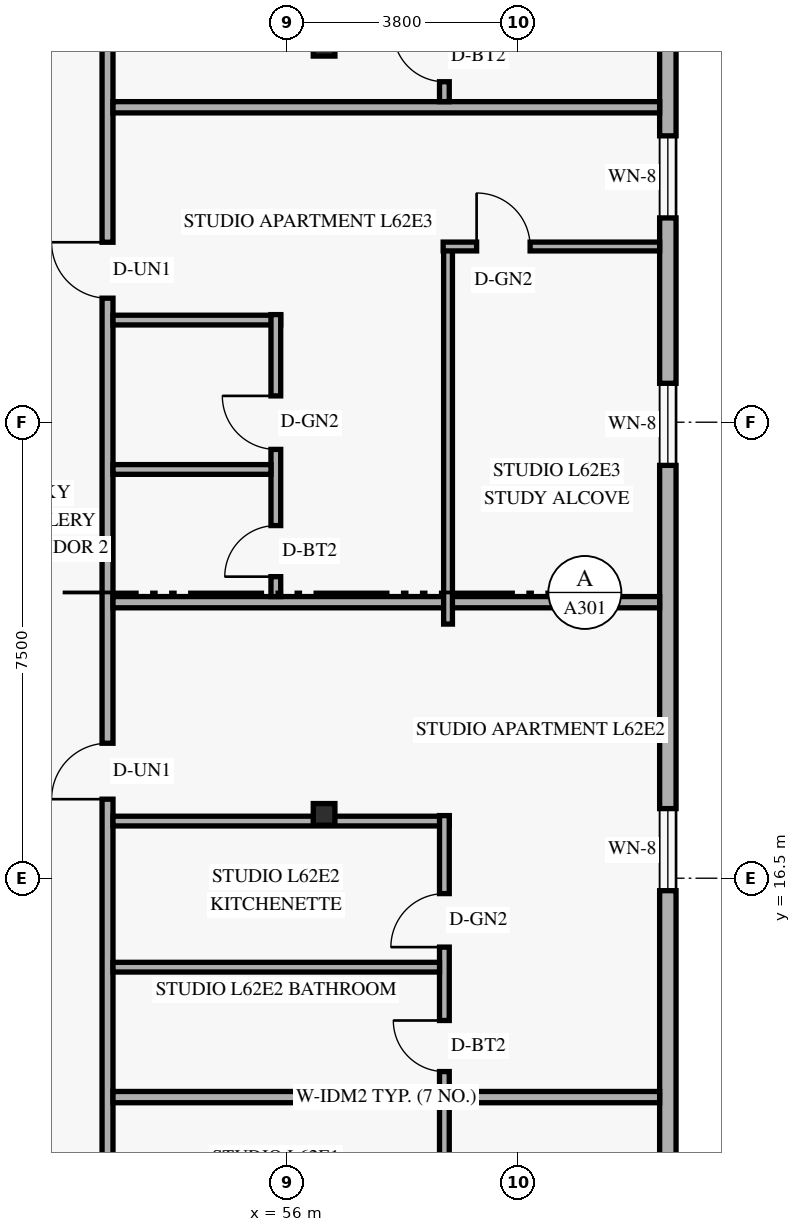
"""IFC4 building model, lengths in metres.
Left out: names, types, materials, properties, quantities, classifications, styles, units other than length and angle.
Written with IfcOpenShell. Run it as: python <this file> out.ifc"""

import sys

from ifc_helpers import new_model, si_unit, direction, frame, frame_2d, origin, origin_2d, place, context, subcontext, project, spatial, rectangle, hollow_rectangle, extrude, element, fill, save


model = new_model("IFC4")
c1 = context("Model", 3, precision=1e-05, world=origin(), true_north=direction((0.0, 1.0)))
c2 = subcontext(c1, "Body", "Model", "MODEL_VIEW")
j1 = project(units=[si_unit("LENGTHUNIT", "METRE"), si_unit("PLANEANGLEUNIT", "RADIAN")], contexts=[c1])
p1 = place(None, origin())
s1 = spatial("IfcSite", under=j1, at=p1, CompositionType="ELEMENT")
p2 = place(p1, origin())
s2 = spatial("IfcBuilding", under=s1, at=p2, CompositionType="ELEMENT")
p3 = place(p2, frame((0.0, 0.0, 238.8)))
s3 = spatial("IfcBuildingStorey", under=s2, at=p3, CompositionType="ELEMENT", Elevation=238.8)
for number, where, z_axis, x_axis in (
    (1, (56.507, 17.55, 0.0), (0.058, 0.0, 0.998), (0.0, 1.0, 0.0)),
    (2, (56.507, 30.2, 0.0), (0.058, 0.0, 0.998), (0.0, 1.0, 0.0)),
):
    element("IfcColumn", number, at=place(p3, frame(where, z_axis=z_axis, x_axis=x_axis)), inside=s3, PredefinedType="COLUMN", context=c2, shape_type="SweptSolid", body=[
        extrude(hollow_rectangle(XDim=0.356, YDim=0.356, WallThickness=0.016, at=origin_2d()), origin(), (0.0, 0.0, 1.0), 3.606),
    ])
p4 = place(p3, frame((62.265, 9.12, 0.0), z_axis=(0.0, 0.0, 1.0), x_axis=(0.0, 1.0, 0.0)))
e3 = element("IfcWall", 3, at=p4, inside=s3, PredefinedType="SOLIDWALL", context=c2, shape_type="SweptSolid", body=[
    extrude(rectangle(XDim=29.76, YDim=0.27, at=frame_2d((14.88, 0.0))), origin(), (0.0, 0.0, 1.0), 3.36),
])
p5 = place(p4, frame((1.215, 0.0, 0.85)))
e4 = element("IfcOpeningElement", 4, at=p5, cuts=e3, PredefinedType="OPENING", context=c2, shape_type="SweptSolid", body=[
    extrude(rectangle(XDim=1.35, YDim=1.55, at=frame_2d((0.675, 0.775))), frame((0.0, 0.145, 0.0), z_axis=(0.0, -1.0, 0.0), x_axis=(1.0, 0.0, 0.0)), (0.0, 0.0, 1.0), 0.29),
])
p6 = place(p4, frame((7.175, 0.0, 0.85)))
e5 = element("IfcOpeningElement", 5, at=p6, cuts=e3, PredefinedType="OPENING", context=c2, shape_type="SweptSolid", body=[
    extrude(rectangle(XDim=1.35, YDim=1.55, at=frame_2d((0.675, 0.775))), frame((0.0, 0.145, 0.0), z_axis=(0.0, -1.0, 0.0), x_axis=(1.0, 0.0, 0.0)), (0.0, 0.0, 1.0), 0.29),
])
p7 = place(p4, frame((14.17, 0.0, 0.85)))
e6 = element("IfcOpeningElement", 6, at=p7, cuts=e3, PredefinedType="OPENING", context=c2, shape_type="SweptSolid", body=[
    extrude(rectangle(XDim=1.35, YDim=1.55, at=frame_2d((0.675, 0.775))), frame((0.0, 0.145, 0.0), z_axis=(0.0, -1.0, 0.0), x_axis=(1.0, 0.0, 0.0)), (0.0, 0.0, 1.0), 0.29),
])
p8 = place(p4, frame((18.24, 0.0, 0.85)))
e7 = element("IfcOpeningElement", 7, at=p8, cuts=e3, PredefinedType="OPENING", context=c2, shape_type="SweptSolid", body=[
    extrude(rectangle(XDim=1.35, YDim=1.55, at=frame_2d((0.675, 0.775))), frame((0.0, 0.145, 0.0), z_axis=(0.0, -1.0, 0.0), x_axis=(1.0, 0.0, 0.0)), (0.0, 0.0, 1.0), 0.29),
])
p9 = place(p4, frame((22.9, 0.0, 0.85)))
e8 = element("IfcOpeningElement", 8, at=p9, cuts=e3, PredefinedType="OPENING", context=c2, shape_type="SweptSolid", body=[
    extrude(rectangle(XDim=1.35, YDim=1.55, at=frame_2d((0.675, 0.775))), frame((0.0, 0.145, 0.0), z_axis=(0.0, -1.0, 0.0), x_axis=(1.0, 0.0, 0.0)), (0.0, 0.0, 1.0), 0.29),
])
p10 = place(p4, frame((27.75, 0.0, 0.85)))
e9 = element("IfcOpeningElement", 9, at=p10, cuts=e3, PredefinedType="OPENING", context=c2, shape_type="SweptSolid", body=[
    extrude(rectangle(XDim=1.35, YDim=1.55, at=frame_2d((0.675, 0.775))), frame((0.0, 0.145, 0.0), z_axis=(0.0, -1.0, 0.0), x_axis=(1.0, 0.0, 0.0)), (0.0, 0.0, 1.0), 0.29),
])
p11 = place(p3, frame((53.05, 5.77, 0.0), z_axis=(0.0, 0.0, 1.0), x_axis=(0.0, 1.0, 0.0)))
e10 = element("IfcWall", 10, at=p11, inside=s3, PredefinedType="STANDARD", context=c2, shape_type="SweptSolid", body=[
    extrude(rectangle(XDim=36.46, YDim=0.18, at=frame_2d((18.23, 0.0))), origin(), (0.0, 0.0, 1.0), 2.803),
])
p12 = place(p11, frame((1.357, 0.0, 0.0)))
e11 = element("IfcOpeningElement", 11, at=p12, cuts=e10, PredefinedType="OPENING", context=c2, shape_type="SweptSolid", body=[
    extrude(rectangle(XDim=0.92, YDim=2.15, at=frame_2d((0.46, 1.075))), frame((0.0, 0.1, 0.0), z_axis=(0.0, -1.0, 0.0), x_axis=(1.0, 0.0, 0.0)), (0.0, 0.0, 1.0), 0.2),
])
p13 = place(p11, frame((12.03, 0.0, 0.0)))
e12 = element("IfcOpeningElement", 12, at=p13, cuts=e10, PredefinedType="OPENING", context=c2, shape_type="SweptSolid", body=[
    extrude(rectangle(XDim=0.92, YDim=2.15, at=frame_2d((0.46, 1.075))), frame((0.0, 0.1, 0.0), z_axis=(0.0, -1.0, 0.0), x_axis=(1.0, 0.0, 0.0)), (0.0, 0.0, 1.0), 0.2),
])
p14 = place(p11, frame((20.27, 0.0, 0.0)))
e13 = element("IfcOpeningElement", 13, at=p14, cuts=e10, PredefinedType="OPENING", context=c2, shape_type="SweptSolid", body=[
    extrude(rectangle(XDim=0.92, YDim=2.15, at=frame_2d((0.46, 1.075))), frame((0.0, 0.1, 0.0), z_axis=(0.0, -1.0, 0.0), x_axis=(1.0, 0.0, 0.0)), (0.0, 0.0, 1.0), 0.2),
])
p15 = place(p11, frame((28.21, 0.0, 0.0)))
e14 = element("IfcOpeningElement", 14, at=p15, cuts=e10, PredefinedType="OPENING", context=c2, shape_type="SweptSolid", body=[
    extrude(rectangle(XDim=0.92, YDim=2.15, at=frame_2d((0.46, 1.075))), frame((0.0, 0.1, 0.0), z_axis=(0.0, -1.0, 0.0), x_axis=(1.0, 0.0, 0.0)), (0.0, 0.0, 1.0), 0.2),
])
p16 = place(p11, frame((35.21, 0.0, 0.0)))
e15 = element("IfcOpeningElement", 15, at=p16, cuts=e10, PredefinedType="OPENING", context=c2, shape_type="SweptSolid", body=[
    extrude(rectangle(XDim=0.92, YDim=2.15, at=frame_2d((0.46, 1.075))), frame((0.0, 0.1, 0.0), z_axis=(0.0, -1.0, 0.0), x_axis=(1.0, 0.0, 0.0)), (0.0, 0.0, 1.0), 0.2),
])
p17 = place(p3, frame((58.59, 8.337, 0.0), z_axis=(0.0, 0.0, 1.0), x_axis=(0.0, 1.0, 0.0)))
e16 = element("IfcWall", 16, at=p17, inside=s3, PredefinedType="PLUMBINGWALL", context=c2, shape_type="SweptSolid", body=[
    extrude(rectangle(XDim=4.563, YDim=0.16, at=frame_2d((2.282, 0.0))), origin(), (0.0, 0.0, 1.0), 3.36),
])
p18 = place(p17, frame((0.42, 0.0, 0.0)))
e17 = element("IfcOpeningElement", 17, at=p18, cuts=e16, PredefinedType="OPENING", context=c2, shape_type="SweptSolid", body=[
    extrude(rectangle(XDim=0.84, YDim=2.12, at=frame_2d((0.42, 1.06))), frame((0.0, 0.09, 0.0), z_axis=(0.0, -1.0, 0.0), x_axis=(1.0, 0.0, 0.0)), (0.0, 0.0, 1.0), 0.18),
])
p19 = place(p17, frame((2.436, 0.0, 0.0)))
e18 = element("IfcOpeningElement", 18, at=p19, cuts=e16, PredefinedType="OPENING", context=c2, shape_type="SweptSolid", body=[
    extrude(rectangle(XDim=0.88, YDim=2.12, at=frame_2d((0.44, 1.06))), frame((0.0, 0.09, 0.0), z_axis=(0.0, -1.0, 0.0), x_axis=(1.0, 0.0, 0.0)), (0.0, 0.0, 1.0), 0.18),
])
p20 = place(p3, frame((53.14, 12.9, 0.0), z_axis=(0.0, 0.0, 1.0), x_axis=(1.0, 0.0, 0.0)))
e19 = element("IfcWall", 19, at=p20, inside=s3, PredefinedType="PARTITIONING", context=c2, shape_type="SweptSolid", body=[
    extrude(rectangle(XDim=8.99, YDim=0.185, at=frame_2d((4.495, 0.0))), origin(), (0.0, 0.0, 1.0), 2.879),
])
p21 = place(p3, frame((53.14, 17.44, 0.0), z_axis=(0.0, 0.0, 1.0), x_axis=(1.0, 0.0, 0.0)))
e20 = element("IfcWall", 20, at=p21, inside=s3, PredefinedType="PLUMBINGWALL", context=c2, shape_type="SweptSolid", body=[
    extrude(rectangle(XDim=5.53, YDim=0.16, at=frame_2d((2.765, 0.0))), origin(), (0.0, 0.0, 1.0), 2.803),
])
p22 = place(p3, frame((58.59, 12.992, 0.0), z_axis=(0.0, 0.0, 1.0), x_axis=(0.0, 1.0, 0.0)))
e21 = element("IfcWall", 21, at=p22, inside=s3, PredefinedType="PLUMBINGWALL", context=c2, shape_type="SweptSolid", body=[
    extrude(rectangle(XDim=4.538, YDim=0.16, at=frame_2d((2.269, 0.0))), origin(), (0.0, 0.0, 1.0), 3.36),
])
p23 = place(p22, frame((0.327, 0.0, 0.0)))
e22 = element("IfcOpeningElement", 22, at=p23, cuts=e21, PredefinedType="OPENING", context=c2, shape_type="SweptSolid", body=[
    extrude(rectangle(XDim=0.84, YDim=2.12, at=frame_2d((0.42, 1.06))), frame((0.0, 0.09, 0.0), z_axis=(0.0, -1.0, 0.0), x_axis=(1.0, 0.0, 0.0)), (0.0, 0.0, 1.0), 0.18),
])
p24 = place(p22, frame((2.375, 0.0, 0.0)))
e23 = element("IfcOpeningElement", 23, at=p24, cuts=e21, PredefinedType="OPENING", context=c2, shape_type="SweptSolid", body=[
    extrude(rectangle(XDim=0.88, YDim=2.12, at=frame_2d((0.44, 1.06))), frame((0.0, 0.09, 0.0), z_axis=(0.0, -1.0, 0.0), x_axis=(1.0, 0.0, 0.0)), (0.0, 0.0, 1.0), 0.18),
])
p25 = place(p3, frame((53.14, 15.037, 0.0), z_axis=(0.0, 0.0, 1.0), x_axis=(1.0, 0.0, 0.0)))
e24 = element("IfcWall", 24, at=p25, inside=s3, PredefinedType="PLUMBINGWALL", context=c2, shape_type="SweptSolid", body=[
    extrude(rectangle(XDim=5.37, YDim=0.16, at=frame_2d((2.685, 0.0))), origin(), (0.0, 0.0, 1.0), 2.879),
])
p26 = place(p3, frame((53.14, 21.04, 0.0), z_axis=(0.0, 0.0, 1.0), x_axis=(1.0, 0.0, 0.0)))
e25 = element("IfcWall", 25, at=p26, inside=s3, PredefinedType="PARTITIONING", context=c2, shape_type="SweptSolid", body=[
    extrude(rectangle(XDim=8.99, YDim=0.185, at=frame_2d((4.495, 0.0))), origin(), (0.0, 0.0, 1.0), 2.879),
])
p27 = place(p3, frame((53.14, 25.68, 0.0), z_axis=(0.0, 0.0, 1.0), x_axis=(1.0, 0.0, 0.0)))
e26 = element("IfcWall", 26, at=p27, inside=s3, PredefinedType="PLUMBINGWALL", context=c2, shape_type="SweptSolid", body=[
    extrude(rectangle(XDim=2.758, YDim=0.16, at=frame_2d((1.379, 0.0))), origin(), (0.0, 0.0, 1.0), 3.36),
])
p28 = place(p3, frame((55.818, 21.133, 0.0), z_axis=(0.0, 0.0, 1.0), x_axis=(0.0, 1.0, 0.0)))
e27 = element("IfcWall", 27, at=p28, inside=s3, PredefinedType="PLUMBINGWALL", context=c2, shape_type="SweptSolid", body=[
    extrude(rectangle(XDim=4.637, YDim=0.16, at=frame_2d((2.319, 0.0))), origin(), (0.0, 0.0, 1.0), 3.36),
])
p29 = place(p28, frame((0.327, 0.0, 0.0)))
e28 = element("IfcOpeningElement", 28, at=p29, cuts=e27, PredefinedType="OPENING", context=c2, shape_type="SweptSolid", body=[
    extrude(rectangle(XDim=0.84, YDim=2.12, at=frame_2d((0.42, 1.06))), frame((0.0, 0.09, 0.0), z_axis=(0.0, -1.0, 0.0), x_axis=(1.0, 0.0, 0.0)), (0.0, 0.0, 1.0), 0.18),
])
p30 = place(p28, frame((2.42, 0.0, 0.0)))
e29 = element("IfcOpeningElement", 29, at=p30, cuts=e27, PredefinedType="OPENING", context=c2, shape_type="SweptSolid", body=[
    extrude(rectangle(XDim=0.88, YDim=2.12, at=frame_2d((0.44, 1.06))), frame((0.0, 0.09, 0.0), z_axis=(0.0, -1.0, 0.0), x_axis=(1.0, 0.0, 0.0)), (0.0, 0.0, 1.0), 0.18),
])
p31 = place(p3, frame((53.14, 23.223, 0.0), z_axis=(0.0, 0.0, 1.0), x_axis=(1.0, 0.0, 0.0)))
e30 = element("IfcWall", 30, at=p31, inside=s3, PredefinedType="PLUMBINGWALL", context=c2, shape_type="SweptSolid", body=[
    extrude(rectangle(XDim=2.598, YDim=0.16, at=frame_2d((1.299, 0.0))), origin(), (0.0, 0.0, 1.0), 3.36),
])
p32 = place(p3, frame((58.65, 20.68, 0.0), z_axis=(0.0, 0.0, 1.0), x_axis=(0.0, 1.0, 0.0)))
e31 = element("IfcWall", 31, at=p32, inside=s3, PredefinedType="PARTITIONING", context=c2, shape_type="SweptSolid", body=[
    extrude(rectangle(XDim=6.21, YDim=0.145, at=frame_2d((3.105, 0.0))), origin(), (0.0, 0.0, 1.0), 3.36),
])
p33 = place(p3, frame((58.57, 26.89, 0.0), z_axis=(0.0, 0.0, 1.0), x_axis=(1.0, 0.0, 0.0)))
e32 = element("IfcWall", 32, at=p33, inside=s3, PredefinedType="PARTITIONING", context=c2, shape_type="SweptSolid", body=[
    extrude(rectangle(XDim=3.56, YDim=0.145, at=frame_2d((1.78, 0.0))), origin(), (0.0, 0.0, 1.0), 3.36),
])
p34 = place(p33, frame((0.55, 0.0, 0.0)))
e33 = element("IfcOpeningElement", 33, at=p34, cuts=e32, PredefinedType="OPENING", context=c2, shape_type="SweptSolid", body=[
    extrude(rectangle(XDim=0.88, YDim=2.12, at=frame_2d((0.44, 1.06))), frame((0.0, 0.083, 0.0), z_axis=(0.0, -1.0, 0.0), x_axis=(1.0, 0.0, 0.0)), (0.0, 0.0, 1.0), 0.165),
])
p35 = place(p3, frame((53.14, 29.18, 0.0), z_axis=(0.0, 0.0, 1.0), x_axis=(1.0, 0.0, 0.0)))
e34 = element("IfcWall", 34, at=p35, inside=s3, PredefinedType="PARTITIONING", context=c2, shape_type="SweptSolid", body=[
    extrude(rectangle(XDim=8.99, YDim=0.185, at=frame_2d((4.495, 0.0))), origin(), (0.0, 0.0, 1.0), 2.879),
])
p36 = place(p3, frame((58.59, 29.272, 0.0), z_axis=(0.0, 0.0, 1.0), x_axis=(0.0, 1.0, 0.0)))
e35 = element("IfcWall", 35, at=p36, inside=s3, PredefinedType="PLUMBINGWALL", context=c2, shape_type="SweptSolid", body=[
    extrude(rectangle(XDim=4.438, YDim=0.16, at=frame_2d((2.219, 0.0))), origin(), (0.0, 0.0, 1.0), 3.36),
])
p37 = place(p36, frame((0.327, 0.0, 0.0)))
e36 = element("IfcOpeningElement", 36, at=p37, cuts=e35, PredefinedType="OPENING", context=c2, shape_type="SweptSolid", body=[
    extrude(rectangle(XDim=0.84, YDim=2.12, at=frame_2d((0.42, 1.06))), frame((0.0, 0.09, 0.0), z_axis=(0.0, -1.0, 0.0), x_axis=(1.0, 0.0, 0.0)), (0.0, 0.0, 1.0), 0.18),
])
p38 = place(p36, frame((2.329, 0.0, 0.0)))
e37 = element("IfcOpeningElement", 37, at=p38, cuts=e35, PredefinedType="OPENING", context=c2, shape_type="SweptSolid", body=[
    extrude(rectangle(XDim=0.88, YDim=2.12, at=frame_2d((0.44, 1.06))), frame((0.0, 0.09, 0.0), z_axis=(0.0, -1.0, 0.0), x_axis=(1.0, 0.0, 0.0)), (0.0, 0.0, 1.0), 0.18),
])
p39 = place(p6, origin())
e38 = element("IfcWindow", 38, at=p39, inside=s3, PartitioningType="SINGLE_PANEL", PredefinedType="WINDOW", context=c2, shape_type="SweptSolid", body=[
    extrude(rectangle(XDim=1.35, YDim=1.55, at=frame_2d((0.675, 0.775))), frame((0.0, 0.03, 0.0), z_axis=(0.0, -1.0, 0.0), x_axis=(1.0, 0.0, 0.0)), (0.0, 0.0, 1.0), 0.06),
])
fill(e5, e38)
p40 = place(p7, origin())
e39 = element("IfcWindow", 39, at=p40, inside=s3, PartitioningType="SINGLE_PANEL", PredefinedType="WINDOW", context=c2, shape_type="SweptSolid", body=[
    extrude(rectangle(XDim=1.35, YDim=1.55, at=frame_2d((0.675, 0.775))), frame((0.0, 0.03, 0.0), z_axis=(0.0, -1.0, 0.0), x_axis=(1.0, 0.0, 0.0)), (0.0, 0.0, 1.0), 0.06),
])
fill(e6, e39)
p41 = place(p8, origin())
e40 = element("IfcWindow", 40, at=p41, inside=s3, PartitioningType="SINGLE_PANEL", PredefinedType="WINDOW", context=c2, shape_type="SweptSolid", body=[
    extrude(rectangle(XDim=1.35, YDim=1.55, at=frame_2d((0.675, 0.775))), frame((0.0, 0.03, 0.0), z_axis=(0.0, -1.0, 0.0), x_axis=(1.0, 0.0, 0.0)), (0.0, 0.0, 1.0), 0.06),
])
fill(e7, e40)
p42 = place(p13, origin())
e41 = element("IfcDoor", 41, at=p42, inside=s3, OperationType="SINGLE_SWING_LEFT", PredefinedType="DOOR", context=c2, shape_type="SweptSolid", body=[
    extrude(rectangle(XDim=0.92, YDim=2.15, at=frame_2d((0.46, 1.075))), frame((0.0, 0.025, 0.0), z_axis=(0.0, -1.0, 0.0), x_axis=(1.0, 0.0, 0.0)), (0.0, 0.0, 1.0), 0.05),
])
fill(e12, e41)
p43 = place(p23, origin())
e42 = element("IfcDoor", 42, at=p43, inside=s3, OperationType="SINGLE_SWING_RIGHT", PredefinedType="DOOR", context=c2, shape_type="SweptSolid", body=[
    extrude(rectangle(XDim=0.84, YDim=2.12, at=frame_2d((0.42, 1.06))), frame((0.0, 0.025, 0.0), z_axis=(0.0, -1.0, 0.0), x_axis=(1.0, 0.0, 0.0)), (0.0, 0.0, 1.0), 0.05),
])
fill(e22, e42)
p44 = place(p24, origin())
e43 = element("IfcDoor", 43, at=p44, inside=s3, OperationType="SINGLE_SWING_LEFT", PredefinedType="DOOR", context=c2, shape_type="SweptSolid", body=[
    extrude(rectangle(XDim=0.88, YDim=2.12, at=frame_2d((0.44, 1.06))), frame((0.0, 0.025, 0.0), z_axis=(0.0, -1.0, 0.0), x_axis=(1.0, 0.0, 0.0)), (0.0, 0.0, 1.0), 0.05),
])
fill(e23, e43)
p45 = place(p34, origin())
e44 = element("IfcDoor", 44, at=p45, inside=s3, OperationType="SINGLE_SWING_LEFT", PredefinedType="DOOR", context=c2, shape_type="SweptSolid", body=[
    extrude(rectangle(XDim=0.88, YDim=2.12, at=frame_2d((0.44, 1.06))), frame((0.0, 0.025, 0.0), z_axis=(0.0, -1.0, 0.0), x_axis=(1.0, 0.0, 0.0)), (0.0, 0.0, 1.0), 0.05),
])
fill(e33, e44)
p46 = place(p14, origin())
e45 = element("IfcDoor", 45, at=p46, inside=s3, OperationType="SINGLE_SWING_RIGHT", PredefinedType="DOOR", context=c2, shape_type="SweptSolid", body=[
    extrude(rectangle(XDim=0.92, YDim=2.15, at=frame_2d((0.46, 1.075))), frame((0.0, 0.025, 0.0), z_axis=(0.0, -1.0, 0.0), x_axis=(1.0, 0.0, 0.0)), (0.0, 0.0, 1.0), 0.05),
])
fill(e13, e45)
p47 = place(p29, origin())
e46 = element("IfcDoor", 46, at=p47, inside=s3, OperationType="SINGLE_SWING_LEFT", PredefinedType="DOOR", context=c2, shape_type="SweptSolid", body=[
    extrude(rectangle(XDim=0.84, YDim=2.12, at=frame_2d((0.42, 1.06))), frame((0.0, 0.025, 0.0), z_axis=(0.0, -1.0, 0.0), x_axis=(1.0, 0.0, 0.0)), (0.0, 0.0, 1.0), 0.05),
])
fill(e28, e46)
p48 = place(p30, origin())
e47 = element("IfcDoor", 47, at=p48, inside=s3, OperationType="SINGLE_SWING_RIGHT", PredefinedType="DOOR", context=c2, shape_type="SweptSolid", body=[
    extrude(rectangle(XDim=0.88, YDim=2.12, at=frame_2d((0.44, 1.06))), frame((0.0, 0.025, 0.0), z_axis=(0.0, -1.0, 0.0), x_axis=(1.0, 0.0, 0.0)), (0.0, 0.0, 1.0), 0.05),
])
fill(e29, e47)
p49 = place(p37, origin())
e48 = element("IfcDoor", 48, at=p49, inside=s3, OperationType="SINGLE_SWING_RIGHT", PredefinedType="DOOR", context=c2, shape_type="SweptSolid", body=[
    extrude(rectangle(XDim=0.84, YDim=2.12, at=frame_2d((0.42, 1.06))), frame((0.0, 0.025, 0.0), z_axis=(0.0, -1.0, 0.0), x_axis=(1.0, 0.0, 0.0)), (0.0, 0.0, 1.0), 0.05),
])
fill(e36, e48)
save(model, sys.argv[1])
